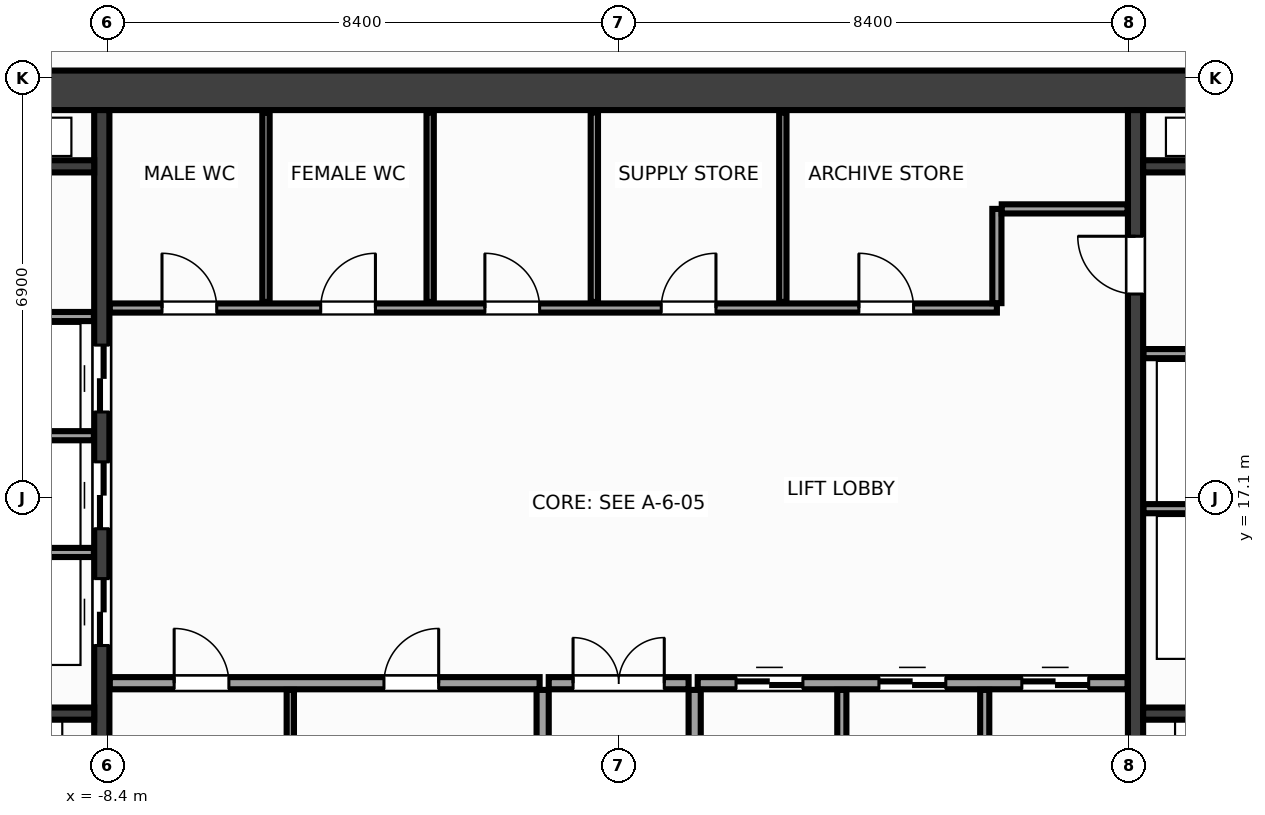
"""IFC4 building model, lengths in metres.
Left out: names, types, materials, properties, quantities, classifications, styles, units other than length and angle.
Written with IfcOpenShell. Run it as: python <this file> out.ifc"""

import sys

from ifc_helpers import new_model, si_unit, direction, frame, frame_2d, origin, place, context, subcontext, project, spatial, rectangle, extrude, source, transform, mapped, element, fill, save


model = new_model("IFC4")
c1 = context("Model", 3, precision=1e-05, world=origin(), true_north=direction((0.0, 1.0)))
c2 = subcontext(c1, "Body", "Model", "MODEL_VIEW")
j1 = project(units=[si_unit("LENGTHUNIT", "METRE"), si_unit("PLANEANGLEUNIT", "RADIAN")], contexts=[c1])
p1 = place(None, origin())
s1 = spatial("IfcSite", under=j1, at=p1, CompositionType="ELEMENT")
p2 = place(p1, origin())
s2 = spatial("IfcBuilding", under=s1, at=p2, CompositionType="ELEMENT")
p3 = place(p2, frame((0.0, 0.0, 185.6)))
s3 = spatial("IfcBuildingStorey", under=s2, at=p3, CompositionType="ELEMENT", Elevation=185.6)
m1 = source(origin(), c2, "Body", "SweptSolid", [
    extrude(rectangle(XDim=31.85, YDim=0.65, at=frame_2d((15.925, 0.0))), origin(), (0.0, 0.0, 1.0), 3.6),
])
p4 = place(p3, frame((-15.925, 23.8, 0.0), z_axis=(0.0, 0.0, 1.0), x_axis=(1.0, 0.0, 0.0)))
e1 = element("IfcWall", 1, at=p4, inside=s3, PredefinedType="SHEAR", context=c2, shape_type="MappedRepresentation", body=[
    mapped(m1, transform((0.0, 0.0, 0.0), x_axis=(1.0, 0.0, 0.0), y_axis=(0.0, 1.0, 0.0), z_axis=(0.0, 0.0, 1.0), scale=1.0)),
])
m2 = source(origin(), c2, "Body", "SweptSolid", [
    extrude(rectangle(XDim=12.95, YDim=0.25, at=frame_2d((6.475, 0.0))), origin(), (0.0, 0.0, 1.0), 3.6),
])
p5 = place(p3, frame((-8.5, 10.525, 0.0), z_axis=(0.0, 0.0, 1.0), x_axis=(0.0, 1.0, 0.0)))
e2 = element("IfcWall", 2, at=p5, inside=s3, PredefinedType="SHEAR", context=c2, shape_type="MappedRepresentation", body=[
    mapped(m2, transform((0.0, 0.0, 0.0), x_axis=(1.0, 0.0, 0.0), y_axis=(0.0, 1.0, 0.0), z_axis=(0.0, 0.0, 1.0), scale=1.0)),
])
p6 = place(p5, frame((4.145, 0.0, 0.0)))
e3 = element("IfcOpeningElement", 3, at=p6, cuts=e2, PredefinedType="OPENING", context=c2, shape_type="SweptSolid", body=[
    extrude(rectangle(XDim=1.1, YDim=2.15, at=frame_2d((0.55, 1.075))), frame((0.0, 0.137, 0.0), z_axis=(0.0, -1.0, 0.0), x_axis=(1.0, 0.0, 0.0)), (0.0, 0.0, 1.0), 0.274),
])
p7 = place(p5, frame((6.065, 0.0, 0.0)))
e4 = element("IfcOpeningElement", 4, at=p7, cuts=e2, PredefinedType="OPENING", context=c2, shape_type="SweptSolid", body=[
    extrude(rectangle(XDim=1.1, YDim=2.15, at=frame_2d((0.55, 1.075))), frame((0.0, 0.137, 0.0), z_axis=(0.0, -1.0, 0.0), x_axis=(1.0, 0.0, 0.0)), (0.0, 0.0, 1.0), 0.274),
])
p8 = place(p5, frame((7.985, 0.0, 0.0)))
e5 = element("IfcOpeningElement", 5, at=p8, cuts=e2, PredefinedType="OPENING", context=c2, shape_type="SweptSolid", body=[
    extrude(rectangle(XDim=1.1, YDim=2.15, at=frame_2d((0.55, 1.075))), frame((0.0, 0.137, 0.0), z_axis=(0.0, -1.0, 0.0), x_axis=(1.0, 0.0, 0.0)), (0.0, 0.0, 1.0), 0.274),
])
p9 = place(p3, frame((8.5, 10.525, 0.0), z_axis=(0.0, 0.0, 1.0), x_axis=(0.0, 1.0, 0.0)))
e6 = element("IfcWall", 6, at=p9, inside=s3, PredefinedType="SHEAR", context=c2, shape_type="MappedRepresentation", body=[
    mapped(m2, transform((0.0, 0.0, 0.0), x_axis=(1.0, 0.0, 0.0), y_axis=(0.0, 1.0, 0.0), z_axis=(0.0, 0.0, 1.0), scale=1.0)),
])
p10 = place(p9, frame((9.925, 0.0, 0.0)))
e7 = element("IfcOpeningElement", 7, at=p10, cuts=e6, PredefinedType="OPENING", context=c2, shape_type="SweptSolid", body=[
    extrude(rectangle(XDim=0.95, YDim=2.15, at=frame_2d((0.475, 1.075))), frame((0.0, 0.137, 0.0), z_axis=(0.0, -1.0, 0.0), x_axis=(1.0, 0.0, 0.0)), (0.0, 0.0, 1.0), 0.274),
])
m3 = source(origin(), c2, "Body", "SweptSolid", [
    extrude(rectangle(XDim=2.825, YDim=0.2, at=frame_2d((1.413, 0.0))), origin(), (0.0, 0.0, 1.0), 3.6),
])
for number, where, z_axis, x_axis in (
    (8, (-11.45, 13.55, 0.0), (0.0, 0.0, 1.0), (1.0, 0.0, 0.0)),
    (9, (8.625, 13.55, 0.0), (0.0, 0.0, 1.0), (1.0, 0.0, 0.0)),
):
    element("IfcWall", number, at=place(p3, frame(where, z_axis=z_axis, x_axis=x_axis)), inside=s3, PredefinedType="SHEAR", context=c2, shape_type="MappedRepresentation", body=[
        mapped(m3, transform((0.0, 0.0, 0.0), x_axis=(1.0, 0.0, 0.0), y_axis=(0.0, 1.0, 0.0), z_axis=(0.0, 0.0, 1.0), scale=1.0)),
    ])
m4 = source(origin(), c2, "Body", "SweptSolid", [
    extrude(rectangle(XDim=3.02, YDim=0.2, at=frame_2d((1.51, 0.0))), origin(), (0.0, 0.0, 1.0), 3.6),
])
for number, where, z_axis, x_axis in (
    (10, (-11.645, 22.55, 0.0), (0.0, 0.0, 1.0), (1.0, 0.0, 0.0)),
    (11, (8.625, 22.55, 0.0), (0.0, 0.0, 1.0), (1.0, 0.0, 0.0)),
):
    element("IfcWall", number, at=place(p3, frame(where, z_axis=z_axis, x_axis=x_axis)), inside=s3, PredefinedType="SHEAR", context=c2, shape_type="MappedRepresentation", body=[
        mapped(m4, transform((0.0, 0.0, 0.0), x_axis=(1.0, 0.0, 0.0), y_axis=(0.0, 1.0, 0.0), z_axis=(0.0, 0.0, 1.0), scale=1.0)),
    ])
m5 = source(origin(), c2, "Body", "SweptSolid", [
    extrude(rectangle(XDim=3.01, YDim=0.15, at=frame_2d((1.505, 0.0))), origin(), (0.0, 0.0, 1.0), 3.3),
])
for number, where, z_axis, x_axis in (
    (12, (-11.64, 16.2, 0.0), (0.0, 0.0, 1.0), (1.0, 0.0, 0.0)),
    (13, (-11.64, 18.12, 0.0), (0.0, 0.0, 1.0), (1.0, 0.0, 0.0)),
    (14, (-11.64, 20.08, 0.0), (0.0, 0.0, 1.0), (1.0, 0.0, 0.0)),
    (15, (8.63, 16.92, 0.0), (0.0, 0.0, 1.0), (1.0, 0.0, 0.0)),
    (16, (8.63, 19.47, 0.0), (0.0, 0.0, 1.0), (1.0, 0.0, 0.0)),
):
    element("IfcWall", number, at=place(p3, frame(where, z_axis=z_axis, x_axis=x_axis)), inside=s3, PredefinedType="PARTITIONING", context=c2, shape_type="MappedRepresentation", body=[
        mapped(m5, transform((0.0, 0.0, 0.0), x_axis=(1.0, 0.0, 0.0), y_axis=(0.0, 1.0, 0.0), z_axis=(0.0, 0.0, 1.0), scale=1.0)),
    ])
m6 = source(origin(), c2, "Body", "SweptSolid", [
    extrude(rectangle(XDim=7.07, YDim=0.2, at=frame_2d((3.535, 0.0))), origin(), (0.0, 0.0, 1.0), 3.3),
])
p11 = place(p3, frame((-8.37, 14.05, 0.0), z_axis=(0.0, 0.0, 1.0), x_axis=(1.0, 0.0, 0.0)))
e17 = element("IfcWall", 17, at=p11, inside=s3, PredefinedType="PARTITIONING", context=c2, shape_type="MappedRepresentation", body=[
    mapped(m6, transform((0.0, 0.0, 0.0), x_axis=(1.0, 0.0, 0.0), y_axis=(0.0, 1.0, 0.0), z_axis=(0.0, 0.0, 1.0), scale=1.0)),
])
p12 = place(p11, frame((1.06, 0.0, 0.0)))
e18 = element("IfcOpeningElement", 18, at=p12, cuts=e17, PredefinedType="OPENING", context=c2, shape_type="SweptSolid", body=[
    extrude(rectangle(XDim=0.9, YDim=2.15, at=frame_2d((0.45, 1.075))), frame((0.0, 0.112, 0.0), z_axis=(0.0, -1.0, 0.0), x_axis=(1.0, 0.0, 0.0)), (0.0, 0.0, 1.0), 0.224),
])
p13 = place(p11, frame((4.51, 0.0, 0.0)))
e19 = element("IfcOpeningElement", 19, at=p13, cuts=e17, PredefinedType="OPENING", context=c2, shape_type="SweptSolid", body=[
    extrude(rectangle(XDim=0.9, YDim=2.15, at=frame_2d((0.45, 1.075))), frame((0.0, 0.112, 0.0), z_axis=(0.0, -1.0, 0.0), x_axis=(1.0, 0.0, 0.0)), (0.0, 0.0, 1.0), 0.224),
])
p14 = place(p3, frame((1.3, 14.05, 0.0), z_axis=(0.0, 0.0, 1.0), x_axis=(1.0, 0.0, 0.0)))
e20 = element("IfcWall", 20, at=p14, inside=s3, PredefinedType="PARTITIONING", context=c2, shape_type="MappedRepresentation", body=[
    mapped(m6, transform((0.0, 0.0, 0.0), x_axis=(1.0, 0.0, 0.0), y_axis=(0.0, 1.0, 0.0), z_axis=(0.0, 0.0, 1.0), scale=1.0)),
])
p15 = place(p14, frame((0.63, 0.0, 0.0)))
e21 = element("IfcOpeningElement", 21, at=p15, cuts=e20, PredefinedType="OPENING", context=c2, shape_type="SweptSolid", body=[
    extrude(rectangle(XDim=1.1, YDim=2.15, at=frame_2d((0.55, 1.075))), frame((0.0, 0.112, 0.0), z_axis=(0.0, -1.0, 0.0), x_axis=(1.0, 0.0, 0.0)), (0.0, 0.0, 1.0), 0.224),
])
p16 = place(p14, frame((2.98, 0.0, 0.0)))
e22 = element("IfcOpeningElement", 22, at=p16, cuts=e20, PredefinedType="OPENING", context=c2, shape_type="SweptSolid", body=[
    extrude(rectangle(XDim=1.1, YDim=2.15, at=frame_2d((0.55, 1.075))), frame((0.0, 0.112, 0.0), z_axis=(0.0, -1.0, 0.0), x_axis=(1.0, 0.0, 0.0)), (0.0, 0.0, 1.0), 0.224),
])
p17 = place(p14, frame((5.33, 0.0, 0.0)))
e23 = element("IfcOpeningElement", 23, at=p17, cuts=e20, PredefinedType="OPENING", context=c2, shape_type="SweptSolid", body=[
    extrude(rectangle(XDim=1.1, YDim=2.15, at=frame_2d((0.55, 1.075))), frame((0.0, 0.112, 0.0), z_axis=(0.0, -1.0, 0.0), x_axis=(1.0, 0.0, 0.0)), (0.0, 0.0, 1.0), 0.224),
])
m7 = source(origin(), c2, "Body", "SweptSolid", [
    extrude(rectangle(XDim=3.415, YDim=0.2, at=frame_2d((1.708, 0.0))), origin(), (0.0, 0.0, 1.0), 3.3),
])
for number, where, z_axis, x_axis in (
    (24, (-1.25, 10.525, 0.0), (0.0, 0.0, 1.0), (0.0, 1.0, 0.0)),
    (25, (1.25, 10.525, 0.0), (0.0, 0.0, 1.0), (0.0, 1.0, 0.0)),
):
    element("IfcWall", number, at=place(p3, frame(where, z_axis=z_axis, x_axis=x_axis)), inside=s3, PredefinedType="PARTITIONING", context=c2, shape_type="MappedRepresentation", body=[
        mapped(m7, transform((0.0, 0.0, 0.0), x_axis=(1.0, 0.0, 0.0), y_axis=(0.0, 1.0, 0.0), z_axis=(0.0, 0.0, 1.0), scale=1.0)),
    ])
m8 = source(origin(), c2, "Body", "SweptSolid", [
    extrude(rectangle(XDim=2.3, YDim=0.2, at=frame_2d((1.15, 0.0))), origin(), (0.0, 0.0, 1.0), 3.3),
])
p18 = place(p3, frame((-1.15, 14.05, 0.0), z_axis=(0.0, 0.0, 1.0), x_axis=(1.0, 0.0, 0.0)))
e26 = element("IfcWall", 26, at=p18, inside=s3, PredefinedType="PARTITIONING", context=c2, shape_type="MappedRepresentation", body=[
    mapped(m8, transform((0.0, 0.0, 0.0), x_axis=(1.0, 0.0, 0.0), y_axis=(0.0, 1.0, 0.0), z_axis=(0.0, 0.0, 1.0), scale=1.0)),
])
p19 = place(p18, frame((0.4, 0.0, 0.0)))
e27 = element("IfcOpeningElement", 27, at=p19, cuts=e26, PredefinedType="OPENING", context=c2, shape_type="SweptSolid", body=[
    extrude(rectangle(XDim=1.5, YDim=2.2, at=frame_2d((0.75, 1.1))), frame((0.0, 0.112, 0.0), z_axis=(0.0, -1.0, 0.0), x_axis=(1.0, 0.0, 0.0)), (0.0, 0.0, 1.0), 0.224),
])
m9 = source(origin(), c2, "Body", "SweptSolid", [
    extrude(rectangle(XDim=14.59, YDim=0.15, at=frame_2d((7.295, 0.0))), origin(), (0.0, 0.0, 1.0), 3.3),
])
p20 = place(p3, frame((-8.37, 20.22, 0.0), z_axis=(0.0, 0.0, 1.0), x_axis=(1.0, 0.0, 0.0)))
e28 = element("IfcWall", 28, at=p20, inside=s3, PredefinedType="PARTITIONING", context=c2, shape_type="MappedRepresentation", body=[
    mapped(m9, transform((0.0, 0.0, 0.0), x_axis=(1.0, 0.0, 0.0), y_axis=(0.0, 1.0, 0.0), z_axis=(0.0, 0.0, 1.0), scale=1.0)),
])
p21 = place(p20, frame((0.86, 0.0, 0.0)))
e29 = element("IfcOpeningElement", 29, at=p21, cuts=e28, PredefinedType="OPENING", context=c2, shape_type="SweptSolid", body=[
    extrude(rectangle(XDim=0.9, YDim=2.15, at=frame_2d((0.45, 1.075))), frame((0.0, 0.087, 0.0), z_axis=(0.0, -1.0, 0.0), x_axis=(1.0, 0.0, 0.0)), (0.0, 0.0, 1.0), 0.174),
])
p22 = place(p20, frame((3.47, 0.0, 0.0)))
e30 = element("IfcOpeningElement", 30, at=p22, cuts=e28, PredefinedType="OPENING", context=c2, shape_type="SweptSolid", body=[
    extrude(rectangle(XDim=0.9, YDim=2.15, at=frame_2d((0.45, 1.075))), frame((0.0, 0.087, 0.0), z_axis=(0.0, -1.0, 0.0), x_axis=(1.0, 0.0, 0.0)), (0.0, 0.0, 1.0), 0.174),
])
p23 = place(p20, frame((6.17, 0.0, 0.0)))
e31 = element("IfcOpeningElement", 31, at=p23, cuts=e28, PredefinedType="OPENING", context=c2, shape_type="SweptSolid", body=[
    extrude(rectangle(XDim=0.9, YDim=2.15, at=frame_2d((0.45, 1.075))), frame((0.0, 0.087, 0.0), z_axis=(0.0, -1.0, 0.0), x_axis=(1.0, 0.0, 0.0)), (0.0, 0.0, 1.0), 0.174),
])
p24 = place(p20, frame((9.07, 0.0, 0.0)))
e32 = element("IfcOpeningElement", 32, at=p24, cuts=e28, PredefinedType="OPENING", context=c2, shape_type="SweptSolid", body=[
    extrude(rectangle(XDim=0.9, YDim=2.15, at=frame_2d((0.45, 1.075))), frame((0.0, 0.087, 0.0), z_axis=(0.0, -1.0, 0.0), x_axis=(1.0, 0.0, 0.0)), (0.0, 0.0, 1.0), 0.174),
])
p25 = place(p20, frame((12.32, 0.0, 0.0)))
e33 = element("IfcOpeningElement", 33, at=p25, cuts=e28, PredefinedType="OPENING", context=c2, shape_type="SweptSolid", body=[
    extrude(rectangle(XDim=0.9, YDim=2.15, at=frame_2d((0.45, 1.075))), frame((0.0, 0.087, 0.0), z_axis=(0.0, -1.0, 0.0), x_axis=(1.0, 0.0, 0.0)), (0.0, 0.0, 1.0), 0.174),
])
m10 = source(origin(), c2, "Body", "SweptSolid", [
    extrude(rectangle(XDim=1.55, YDim=0.15, at=frame_2d((0.775, 0.0))), origin(), (0.0, 0.0, 1.0), 3.3),
])
p26 = place(p3, frame((6.22, 20.3, 0.0), z_axis=(0.0, 0.0, 1.0), x_axis=(0.0, 1.0, 0.0)))
e34 = element("IfcWall", 34, at=p26, inside=s3, PredefinedType="PARTITIONING", context=c2, shape_type="MappedRepresentation", body=[
    mapped(m10, transform((0.0, 0.0, 0.0), x_axis=(1.0, 0.0, 0.0), y_axis=(0.0, 1.0, 0.0), z_axis=(0.0, 0.0, 1.0), scale=1.0)),
])
m11 = source(origin(), c2, "Body", "SweptSolid", [
    extrude(rectangle(XDim=2.07, YDim=0.15, at=frame_2d((1.035, 0.0))), origin(), (0.0, 0.0, 1.0), 3.3),
])
p27 = place(p3, frame((6.3, 21.85, 0.0), z_axis=(0.0, 0.0, 1.0), x_axis=(1.0, 0.0, 0.0)))
e35 = element("IfcWall", 35, at=p27, inside=s3, PredefinedType="PARTITIONING", context=c2, shape_type="MappedRepresentation", body=[
    mapped(m11, transform((0.0, 0.0, 0.0), x_axis=(1.0, 0.0, 0.0), y_axis=(0.0, 1.0, 0.0), z_axis=(0.0, 0.0, 1.0), scale=1.0)),
])
m12 = source(origin(), c2, "Body", "SweptSolid", [
    extrude(rectangle(XDim=3.415, YDim=0.12, at=frame_2d((1.708, 0.0))), origin(), (0.0, 0.0, 1.0), 3.3),
])
p28 = place(p3, frame((-5.4, 10.525, 0.0), z_axis=(0.0, 0.0, 1.0), x_axis=(0.0, 1.0, 0.0)))
e36 = element("IfcWall", 36, at=p28, inside=s3, PredefinedType="PARTITIONING", context=c2, shape_type="MappedRepresentation", body=[
    mapped(m12, transform((0.0, 0.0, 0.0), x_axis=(1.0, 0.0, 0.0), y_axis=(0.0, 1.0, 0.0), z_axis=(0.0, 0.0, 1.0), scale=1.0)),
])
m13 = source(origin(), c2, "Body", "SweptSolid", [
    extrude(rectangle(XDim=3.415, YDim=0.15, at=frame_2d((1.708, 0.0))), origin(), (0.0, 0.0, 1.0), 3.3),
])
for number, where, z_axis, x_axis in (
    (37, (3.67, 10.525, 0.0), (0.0, 0.0, 1.0), (0.0, 1.0, 0.0)),
    (38, (6.02, 10.525, 0.0), (0.0, 0.0, 1.0), (0.0, 1.0, 0.0)),
):
    element("IfcWall", number, at=place(p3, frame(where, z_axis=z_axis, x_axis=x_axis)), inside=s3, PredefinedType="PARTITIONING", context=c2, shape_type="MappedRepresentation", body=[
        mapped(m13, transform((0.0, 0.0, 0.0), x_axis=(1.0, 0.0, 0.0), y_axis=(0.0, 1.0, 0.0), z_axis=(0.0, 0.0, 1.0), scale=1.0)),
    ])
m14 = source(origin(), c2, "Body", "SweptSolid", [
    extrude(rectangle(XDim=3.115, YDim=0.12, at=frame_2d((1.558, 0.0))), origin(), (0.0, 0.0, 1.0), 3.3),
])
for number, where, z_axis, x_axis in (
    (39, (-5.8, 20.32, 0.0), (0.0, 0.0, 1.0), (0.0, 1.0, 0.0)),
    (40, (-3.1, 20.32, 0.0), (0.0, 0.0, 1.0), (0.0, 1.0, 0.0)),
    (41, (-0.4, 20.32, 0.0), (0.0, 0.0, 1.0), (0.0, 1.0, 0.0)),
    (42, (2.7, 20.32, 0.0), (0.0, 0.0, 1.0), (0.0, 1.0, 0.0)),
):
    element("IfcWall", number, at=place(p3, frame(where, z_axis=z_axis, x_axis=x_axis)), inside=s3, PredefinedType="PARTITIONING", context=c2, shape_type="MappedRepresentation", body=[
        mapped(m14, transform((0.0, 0.0, 0.0), x_axis=(1.0, 0.0, 0.0), y_axis=(0.0, 1.0, 0.0), z_axis=(0.0, 0.0, 1.0), scale=1.0)),
    ])
m15 = source(origin(), c2, "Body", "SweptSolid", [
    extrude(rectangle(XDim=1.1, YDim=2.15, at=frame_2d((0.55, 1.075))), frame((0.0, 0.025, 0.0), z_axis=(0.0, -1.0, 0.0), x_axis=(1.0, 0.0, 0.0)), (0.0, 0.0, 1.0), 0.05),
])
p29 = place(p6, origin())
e43 = element("IfcDoor", 43, at=p29, inside=s3, OperationType="DOUBLE_DOOR_SLIDING", PredefinedType="DOOR", context=c2, shape_type="MappedRepresentation", body=[
    mapped(m15, transform((0.0, 0.0, 0.0), x_axis=(1.0, 0.0, 0.0), y_axis=(0.0, 1.0, 0.0), z_axis=(0.0, 0.0, 1.0), scale=1.0)),
])
fill(e3, e43)
p30 = place(p7, origin())
e44 = element("IfcDoor", 44, at=p30, inside=s3, OperationType="DOUBLE_DOOR_SLIDING", PredefinedType="DOOR", context=c2, shape_type="MappedRepresentation", body=[
    mapped(m15, transform((0.0, 0.0, 0.0), x_axis=(1.0, 0.0, 0.0), y_axis=(0.0, 1.0, 0.0), z_axis=(0.0, 0.0, 1.0), scale=1.0)),
])
fill(e4, e44)
p31 = place(p8, origin())
e45 = element("IfcDoor", 45, at=p31, inside=s3, OperationType="DOUBLE_DOOR_SLIDING", PredefinedType="DOOR", context=c2, shape_type="MappedRepresentation", body=[
    mapped(m15, transform((0.0, 0.0, 0.0), x_axis=(1.0, 0.0, 0.0), y_axis=(0.0, 1.0, 0.0), z_axis=(0.0, 0.0, 1.0), scale=1.0)),
])
fill(e5, e45)
m16 = source(origin(), c2, "Body", "SweptSolid", [
    extrude(rectangle(XDim=0.95, YDim=2.15, at=frame_2d((0.475, 1.075))), frame((0.0, 0.025, 0.0), z_axis=(0.0, -1.0, 0.0), x_axis=(1.0, 0.0, 0.0)), (0.0, 0.0, 1.0), 0.05),
])
p32 = place(p10, origin())
e46 = element("IfcDoor", 46, at=p32, inside=s3, OperationType="SINGLE_SWING_RIGHT", PredefinedType="DOOR", context=c2, shape_type="MappedRepresentation", body=[
    mapped(m16, transform((0.0, 0.0, 0.0), x_axis=(1.0, 0.0, 0.0), y_axis=(0.0, 1.0, 0.0), z_axis=(0.0, 0.0, 1.0), scale=1.0)),
])
fill(e7, e46)
m17 = source(origin(), c2, "Body", "SweptSolid", [
    extrude(rectangle(XDim=0.9, YDim=2.15, at=frame_2d((0.45, 1.075))), frame((0.0, 0.025, 0.0), z_axis=(0.0, -1.0, 0.0), x_axis=(1.0, 0.0, 0.0)), (0.0, 0.0, 1.0), 0.05),
])
p33 = place(p12, origin())
e47 = element("IfcDoor", 47, at=p33, inside=s3, OperationType="SINGLE_SWING_LEFT", PredefinedType="DOOR", context=c2, shape_type="MappedRepresentation", body=[
    mapped(m17, transform((0.0, 0.0, 0.0), x_axis=(1.0, 0.0, 0.0), y_axis=(0.0, 1.0, 0.0), z_axis=(0.0, 0.0, 1.0), scale=1.0)),
])
fill(e18, e47)
p34 = place(p13, origin())
e48 = element("IfcDoor", 48, at=p34, inside=s3, OperationType="SINGLE_SWING_RIGHT", PredefinedType="DOOR", context=c2, shape_type="MappedRepresentation", body=[
    mapped(m17, transform((0.0, 0.0, 0.0), x_axis=(1.0, 0.0, 0.0), y_axis=(0.0, 1.0, 0.0), z_axis=(0.0, 0.0, 1.0), scale=1.0)),
])
fill(e19, e48)
p35 = place(p15, origin())
e49 = element("IfcDoor", 49, at=p35, inside=s3, OperationType="DOUBLE_DOOR_SLIDING", PredefinedType="DOOR", context=c2, shape_type="MappedRepresentation", body=[
    mapped(m15, transform((0.0, 0.0, 0.0), x_axis=(1.0, 0.0, 0.0), y_axis=(0.0, 1.0, 0.0), z_axis=(0.0, 0.0, 1.0), scale=1.0)),
])
fill(e21, e49)
p36 = place(p16, origin())
e50 = element("IfcDoor", 50, at=p36, inside=s3, OperationType="DOUBLE_DOOR_SLIDING", PredefinedType="DOOR", context=c2, shape_type="MappedRepresentation", body=[
    mapped(m15, transform((0.0, 0.0, 0.0), x_axis=(1.0, 0.0, 0.0), y_axis=(0.0, 1.0, 0.0), z_axis=(0.0, 0.0, 1.0), scale=1.0)),
])
fill(e22, e50)
p37 = place(p17, origin())
e51 = element("IfcDoor", 51, at=p37, inside=s3, OperationType="DOUBLE_DOOR_SLIDING", PredefinedType="DOOR", context=c2, shape_type="MappedRepresentation", body=[
    mapped(m15, transform((0.0, 0.0, 0.0), x_axis=(1.0, 0.0, 0.0), y_axis=(0.0, 1.0, 0.0), z_axis=(0.0, 0.0, 1.0), scale=1.0)),
])
fill(e23, e51)
m18 = source(origin(), c2, "Body", "SweptSolid", [
    extrude(rectangle(XDim=1.5, YDim=2.2, at=frame_2d((0.75, 1.1))), frame((0.0, 0.025, 0.0), z_axis=(0.0, -1.0, 0.0), x_axis=(1.0, 0.0, 0.0)), (0.0, 0.0, 1.0), 0.05),
])
p38 = place(p19, origin())
e52 = element("IfcDoor", 52, at=p38, inside=s3, OperationType="DOUBLE_DOOR_SINGLE_SWING", PredefinedType="DOOR", context=c2, shape_type="MappedRepresentation", body=[
    mapped(m18, transform((0.0, 0.0, 0.0), x_axis=(1.0, 0.0, 0.0), y_axis=(0.0, 1.0, 0.0), z_axis=(0.0, 0.0, 1.0), scale=1.0)),
])
fill(e27, e52)
p39 = place(p21, origin())
e53 = element("IfcDoor", 53, at=p39, inside=s3, OperationType="SINGLE_SWING_LEFT", PredefinedType="DOOR", context=c2, shape_type="MappedRepresentation", body=[
    mapped(m17, transform((0.0, 0.0, 0.0), x_axis=(1.0, 0.0, 0.0), y_axis=(0.0, 1.0, 0.0), z_axis=(0.0, 0.0, 1.0), scale=1.0)),
])
fill(e29, e53)
p40 = place(p22, origin())
e54 = element("IfcDoor", 54, at=p40, inside=s3, OperationType="SINGLE_SWING_RIGHT", PredefinedType="DOOR", context=c2, shape_type="MappedRepresentation", body=[
    mapped(m17, transform((0.0, 0.0, 0.0), x_axis=(1.0, 0.0, 0.0), y_axis=(0.0, 1.0, 0.0), z_axis=(0.0, 0.0, 1.0), scale=1.0)),
])
fill(e30, e54)
p41 = place(p23, origin())
e55 = element("IfcDoor", 55, at=p41, inside=s3, OperationType="SINGLE_SWING_LEFT", PredefinedType="DOOR", context=c2, shape_type="MappedRepresentation", body=[
    mapped(m17, transform((0.0, 0.0, 0.0), x_axis=(1.0, 0.0, 0.0), y_axis=(0.0, 1.0, 0.0), z_axis=(0.0, 0.0, 1.0), scale=1.0)),
])
fill(e31, e55)
p42 = place(p24, origin())
e56 = element("IfcDoor", 56, at=p42, inside=s3, OperationType="SINGLE_SWING_RIGHT", PredefinedType="DOOR", context=c2, shape_type="MappedRepresentation", body=[
    mapped(m17, transform((0.0, 0.0, 0.0), x_axis=(1.0, 0.0, 0.0), y_axis=(0.0, 1.0, 0.0), z_axis=(0.0, 0.0, 1.0), scale=1.0)),
])
fill(e32, e56)
p43 = place(p25, origin())
e57 = element("IfcDoor", 57, at=p43, inside=s3, OperationType="SINGLE_SWING_LEFT", PredefinedType="DOOR", context=c2, shape_type="MappedRepresentation", body=[
    mapped(m17, transform((0.0, 0.0, 0.0), x_axis=(1.0, 0.0, 0.0), y_axis=(0.0, 1.0, 0.0), z_axis=(0.0, 0.0, 1.0), scale=1.0)),
])
fill(e33, e57)
save(model, sys.argv[1])
